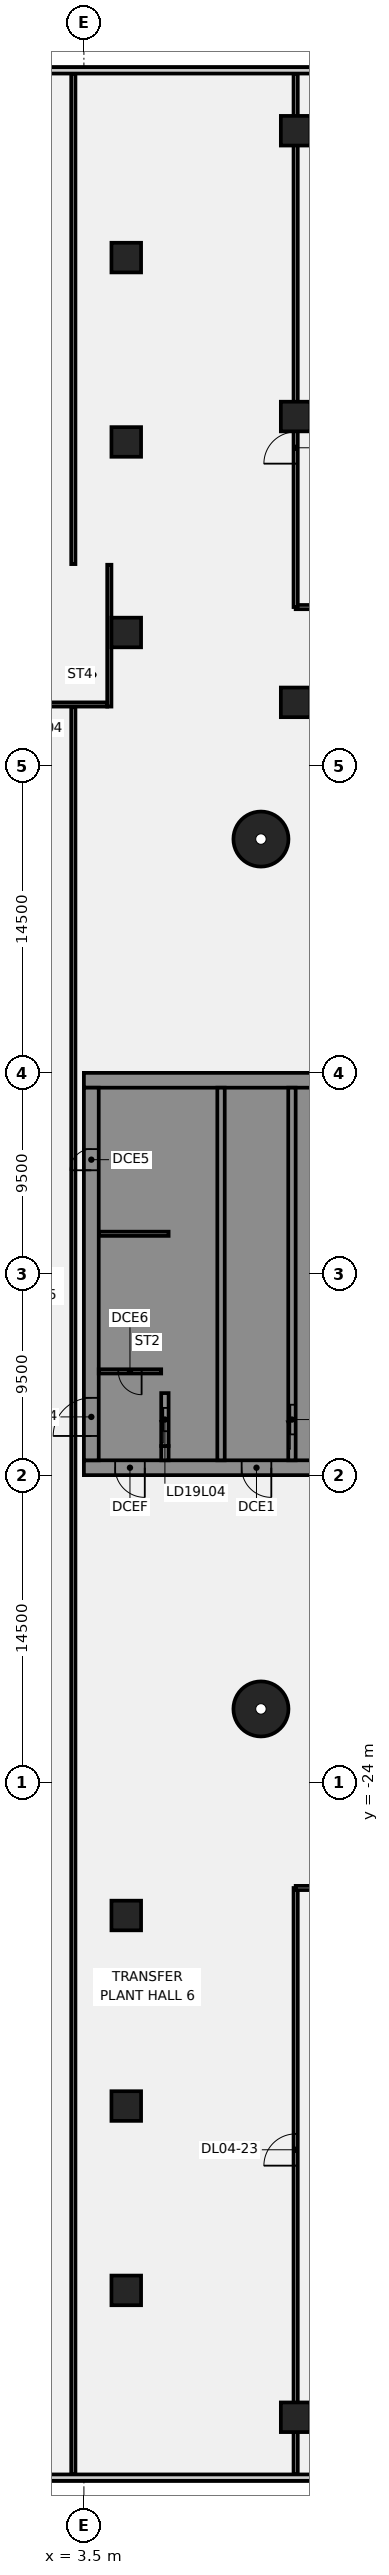
"""IFC4 building model, lengths in metres.
Left out: names, types, materials, properties, quantities, classifications, styles, units other than length and angle.
Written with IfcOpenShell. Run it as: python <this file> out.ifc"""

import sys

from ifc_helpers import new_model, si_unit, direction, frame, frame_2d, origin, origin_2d, place, context, subcontext, project, spatial, polyline, rectangle, circle, outline, extrude, element, fill, save


model = new_model("IFC4")
c1 = context("Model", 3, precision=1e-05, world=origin(), true_north=direction((0.0, 1.0)))
c2 = subcontext(c1, "Body", "Model", "MODEL_VIEW")
j1 = project(units=[si_unit("LENGTHUNIT", "METRE"), si_unit("PLANEANGLEUNIT", "RADIAN")], contexts=[c1])
p1 = place(None, origin())
s1 = spatial("IfcSite", under=j1, at=p1, CompositionType="ELEMENT")
p2 = place(p1, origin())
s2 = spatial("IfcBuilding", under=s1, at=p2, CompositionType="ELEMENT")
p3 = place(p2, frame((0.0, 0.0, 25.0)))
s3 = spatial("IfcBuildingStorey", under=s2, at=p3, CompositionType="ELEMENT", Elevation=25.0)
for number, where, z_axis, x_axis in (
    (1, (11.86, 20.543, -0.45), (0.0, 0.0, 1.0), (1.0, 0.0, 0.0)),
    (2, (11.86, -20.543, -0.45), (0.0, 0.0, 1.0), (1.0, 0.0, 0.0)),
):
    element("IfcColumn", number, at=place(p3, frame(where, z_axis=z_axis, x_axis=x_axis)), inside=s3, PredefinedType="COLUMN", context=c2, shape_type="SweptSolid", body=[
        extrude(circle(Radius=1.3, at=origin_2d()), origin(), (0.0, 0.0, 1.0), 4.35),
    ])
for number, where, z_axis, x_axis in (
    (3, (5.5, 39.3, -0.45), (0.0, 0.0, 1.0), (1.0, 0.0, 0.0)),
    (4, (5.5, 30.3, -0.45), (0.0, 0.0, 1.0), (1.0, 0.0, 0.0)),
    (5, (5.5, 48.008, -0.45), (0.0, 0.0, 1.0), (1.0, 0.0, 0.0)),
    (6, (5.5, -39.3, -0.45), (0.0, 0.0, 1.0), (1.0, 0.0, 0.0)),
    (7, (5.5, -30.3, -0.45), (0.0, 0.0, 1.0), (1.0, 0.0, 0.0)),
    (8, (5.5, -48.008, -0.45), (0.0, 0.0, 1.0), (1.0, 0.0, 0.0)),
    (9, (13.5, -54.0, -0.45), (0.0, 0.0, 1.0), (1.0, 0.0, 0.0)),
    (10, (13.5, 27.0, -0.45), (0.0, 0.0, 1.0), (1.0, 0.0, 0.0)),
    (11, (13.5, 40.5, -0.45), (0.0, 0.0, 1.0), (1.0, 0.0, 0.0)),
    (12, (13.5, 54.0, -0.45), (0.0, 0.0, 1.0), (1.0, 0.0, 0.0)),
):
    element("IfcColumn", number, at=place(p3, frame(where, z_axis=z_axis, x_axis=x_axis)), inside=s3, PredefinedType="COLUMN", context=c2, shape_type="SweptSolid", body=[
        extrude(rectangle(XDim=1.4, YDim=1.4, at=origin_2d()), origin(), (0.0, 0.0, 1.0), 4.35),
    ])
p4 = place(p3, frame((3.0, -56.699, 0.0), z_axis=(0.0, 0.0, 1.0), x_axis=(0.0, 1.0, 0.0)))
e13 = element("IfcWall", 13, at=p4, inside=s3, PredefinedType="PARTITIONING", context=c2, shape_type="SweptSolid", body=[
    extrude(rectangle(XDim=83.469, YDim=0.2, at=frame_2d((41.734, 0.0))), origin(), (0.0, 0.0, 1.0), 3.9),
])
p5 = place(p3, frame((3.0, 33.53, 0.0), z_axis=(0.0, 0.0, 1.0), x_axis=(0.0, 1.0, 0.0)))
e14 = element("IfcWall", 14, at=p5, inside=s3, PredefinedType="PARTITIONING", context=c2, shape_type="SweptSolid", body=[
    extrude(rectangle(XDim=23.169, YDim=0.2, at=frame_2d((11.584, 0.0))), origin(), (0.0, 0.0, 1.0), 3.9),
])
p6 = place(p3, frame((13.5, -56.699, 0.0), z_axis=(0.0, 0.0, 1.0), x_axis=(0.0, 1.0, 0.0)))
e15 = element("IfcWall", 15, at=p6, inside=s3, PredefinedType="PARTITIONING", context=c2, shape_type="SweptSolid", body=[
    extrude(rectangle(XDim=27.699, YDim=0.2, at=frame_2d((13.85, 0.0))), origin(), (0.0, 0.0, 1.0), 3.9),
])
p7 = place(p6, frame((14.584, 0.0, 0.0)))
e16 = element("IfcOpeningElement", 16, at=p7, cuts=e15, PredefinedType="OPENING", context=c2, shape_type="SweptSolid", body=[
    extrude(rectangle(XDim=1.5, YDim=2.1, at=frame_2d((0.75, 1.05))), frame((0.0, 0.11, 0.0), z_axis=(0.0, -1.0, 0.0), x_axis=(1.0, 0.0, 0.0)), (0.0, 0.0, 1.0), 0.22),
])
p8 = place(p3, frame((13.5, -29.0, 0.0), z_axis=(0.0, 0.0, 1.0), x_axis=(1.0, 0.0, 0.0)))
e17 = element("IfcWall", 17, at=p8, inside=s3, PredefinedType="PARTITIONING", context=c2, shape_type="SweptSolid", body=[
    extrude(rectangle(XDim=2.92, YDim=0.2, at=frame_2d((1.46, 0.0))), origin(), (0.0, 0.0, 1.0), 3.9),
])
p9 = place(p3, frame((13.5, 31.5, 0.0), z_axis=(0.0, 0.0, 1.0), x_axis=(1.0, 0.0, 0.0)))
e18 = element("IfcWall", 18, at=p9, inside=s3, PredefinedType="PARTITIONING", context=c2, shape_type="SweptSolid", body=[
    extrude(rectangle(XDim=10.12, YDim=0.2, at=frame_2d((5.06, 0.0))), origin(), (0.0, 0.0, 1.0), 3.9),
])
p10 = place(p3, frame((13.5, 31.5, 0.0), z_axis=(0.0, 0.0, 1.0), x_axis=(0.0, 1.0, 0.0)))
e19 = element("IfcWall", 19, at=p10, inside=s3, PredefinedType="PARTITIONING", context=c2, shape_type="SweptSolid", body=[
    extrude(rectangle(XDim=25.199, YDim=0.2, at=frame_2d((12.6, 0.0))), origin(), (0.0, 0.0, 1.0), 3.9),
])
p11 = place(p10, frame((6.775, 0.0, 0.0)))
e20 = element("IfcOpeningElement", 20, at=p11, cuts=e19, PredefinedType="OPENING", context=c2, shape_type="SweptSolid", body=[
    extrude(rectangle(XDim=1.5, YDim=2.1, at=frame_2d((0.75, 1.05))), frame((0.0, 0.11, 0.0), z_axis=(0.0, -1.0, 0.0), x_axis=(1.0, 0.0, 0.0)), (0.0, 0.0, 1.0), 0.22),
])
p12 = place(p3, frame((55.988, 56.85, 0.0), z_axis=(0.0, 0.0, 1.0), x_axis=(-1.0, 0.0, 0.0)))
e21 = element("IfcWall", 21, at=p12, inside=s3, PredefinedType="SOLIDWALL", context=c2, shape_type="SweptSolid", body=[
    extrude(rectangle(XDim=111.977, YDim=0.3, at=frame_2d((55.988, 0.0))), origin(), (0.0, 0.0, 1.0), 3.9),
])
p13 = place(p12, frame((12.488, 0.0, 1.4)))
e22 = element("IfcOpeningElement", 22, at=p13, cuts=e21, PredefinedType="OPENING", context=c2, shape_type="SweptSolid", body=[
    extrude(rectangle(XDim=6.0, YDim=2.2, at=frame_2d((3.0, 1.1))), frame((0.0, 0.16, 0.0), z_axis=(0.0, -1.0, 0.0), x_axis=(1.0, 0.0, 0.0)), (0.0, 0.0, 1.0), 0.32),
])
p14 = place(p3, frame((-55.988, -56.85, 0.0), z_axis=(0.0, 0.0, 1.0), x_axis=(1.0, 0.0, 0.0)))
e23 = element("IfcWall", 23, at=p14, inside=s3, PredefinedType="SOLIDWALL", context=c2, shape_type="SweptSolid", body=[
    extrude(rectangle(XDim=111.977, YDim=0.3, at=frame_2d((55.988, 0.0))), origin(), (0.0, 0.0, 1.0), 3.9),
])
p15 = place(p14, frame((12.488, 0.0, 1.4)))
e24 = element("IfcOpeningElement", 24, at=p15, cuts=e23, PredefinedType="OPENING", context=c2, shape_type="SweptSolid", body=[
    extrude(rectangle(XDim=6.0, YDim=2.2, at=frame_2d((3.0, 1.1))), frame((0.0, 0.16, 0.0), z_axis=(0.0, -1.0, 0.0), x_axis=(1.0, 0.0, 0.0)), (0.0, 0.0, 1.0), 0.32),
])
p16 = place(p3, frame((16.5, -9.15, 0.0), z_axis=(0.0, 0.0, 1.0), x_axis=(-1.0, 0.0, 0.0)))
e25 = element("IfcWall", 25, at=p16, inside=s3, PredefinedType="SHEAR", context=c2, shape_type="SweptSolid", body=[
    extrude(rectangle(XDim=13.0, YDim=0.7, at=frame_2d((6.5, 0.0))), origin(), (0.0, 0.0, 1.0), 3.9),
])
p17 = place(p16, frame((4.15, 0.0, 0.0)))
e26 = element("IfcOpeningElement", 26, at=p17, cuts=e25, PredefinedType="OPENING", context=c2, shape_type="SweptSolid", body=[
    extrude(rectangle(XDim=1.4, YDim=2.1, at=frame_2d((0.7, 1.05))), frame((0.0, 0.36, 0.0), z_axis=(0.0, -1.0, 0.0), x_axis=(1.0, 0.0, 0.0)), (0.0, 0.0, 1.0), 0.72),
])
p18 = place(p16, frame((10.125, 0.0, 0.0)))
e27 = element("IfcOpeningElement", 27, at=p18, cuts=e25, PredefinedType="OPENING", context=c2, shape_type="SweptSolid", body=[
    extrude(rectangle(XDim=1.4, YDim=2.1, at=frame_2d((0.7, 1.05))), frame((0.0, 0.36, 0.0), z_axis=(0.0, -1.0, 0.0), x_axis=(1.0, 0.0, 0.0)), (0.0, 0.0, 1.0), 0.72),
])
p19 = place(p3, origin())
e28 = element("IfcWall", 28, at=p19, inside=s3, PredefinedType="SHEAR", context=c2, shape_type="SweptSolid", body=[
    extrude(outline(polyline([(13.5, -8.8), (15.8, -8.8), (16.5, -8.8), (16.5, 8.8), (15.8, 8.8), (13.5, 8.8), (13.5, 8.125), (15.8, 8.125), (15.8, 5.625), (13.5, 5.625), (13.5, 5.375), (15.8, 5.375), (15.8, 2.875), (13.5, 2.875), (13.5, 2.625), (15.8, 2.625), (15.8, 0.125), (13.5, 0.125), (13.5, -0.125), (15.8, -0.125), (15.8, -2.625), (13.5, -2.625), (13.5, -2.875), (15.8, -2.875), (15.8, -5.375), (13.5, -5.375), (13.5, -5.625), (15.8, -5.625), (15.8, -8.125), (13.5, -8.125), (13.5, -8.8)])), origin(), (0.0, 0.0, 1.0), 3.9),
])
p20 = place(p3, frame((16.5, 9.15, 0.0), z_axis=(0.0, 0.0, 1.0), x_axis=(-1.0, 0.0, 0.0)))
e29 = element("IfcWall", 29, at=p20, inside=s3, PredefinedType="SHEAR", context=c2, shape_type="SweptSolid", body=[
    extrude(rectangle(XDim=13.0, YDim=0.7, at=frame_2d((6.5, 0.0))), origin(), (0.0, 0.0, 1.0), 3.9),
])
p21 = place(p3, origin())
e30 = element("IfcWall", 30, at=p21, inside=s3, PredefinedType="SHEAR", context=c2, shape_type="SweptSolid", body=[
    extrude(outline(polyline([(9.8, -5.375), (7.5, -5.375), (7.5, -2.875), (9.8, -2.875), (9.8, -2.625), (7.5, -2.625), (7.5, -0.125), (9.8, -0.125), (9.8, 0.125), (7.5, 0.125), (7.5, 2.625), (9.8, 2.625), (9.8, 2.875), (7.5, 2.875), (7.5, 5.375), (9.8, 5.375), (9.8, 5.625), (7.5, 5.625), (7.5, 8.125), (9.8, 8.125), (9.8, 8.8), (7.5, 8.8), (7.15, 8.8), (7.15, -5.625), (7.5, -5.625), (9.8, -5.625), (9.8, -5.375)])), origin(), (0.0, 0.0, 1.0), 3.9),
])
p22 = place(p3, origin())
e31 = element("IfcWall", 31, at=p22, inside=s3, PredefinedType="SHEAR", context=c2, shape_type="SweptSolid", body=[
    extrude(outline(polyline([(7.5, -8.125), (7.5, -8.8), (9.8, -8.8), (9.8, -8.125), (9.8, -5.625), (9.55, -5.625), (9.55, -8.125), (7.5, -8.125)])), origin(), (0.0, 0.0, 1.0), 3.9),
])
p23 = place(p3, frame((7.325, -8.8, 0.0), z_axis=(0.0, 0.0, 1.0), x_axis=(0.0, 1.0, 0.0)))
e32 = element("IfcWall", 32, at=p23, inside=s3, PredefinedType="SHEAR", context=c2, shape_type="SweptSolid", body=[
    extrude(rectangle(XDim=0.675, YDim=0.35, at=frame_2d((0.337, 0.0))), origin(), (0.0, 0.0, 1.0), 3.9),
])
p24 = place(p3, frame((7.5, 1.9, 0.0), z_axis=(0.0, 0.0, 1.0), x_axis=(-1.0, 0.0, 0.0)))
e33 = element("IfcWall", 33, at=p24, inside=s3, PredefinedType="SHEAR", context=c2, shape_type="SweptSolid", body=[
    extrude(rectangle(XDim=3.3, YDim=0.2, at=frame_2d((1.65, 0.0))), origin(), (0.0, 0.0, 1.0), 3.9),
])
p25 = place(p3, frame((13.325, -8.8, 0.0), z_axis=(0.0, 0.0, 1.0), x_axis=(0.0, 1.0, 0.0)))
e34 = element("IfcWall", 34, at=p25, inside=s3, PredefinedType="SHEAR", context=c2, shape_type="SweptSolid", body=[
    extrude(rectangle(XDim=17.6, YDim=0.35, at=frame_2d((8.8, 0.0))), origin(), (0.0, 0.0, 1.0), 3.9),
])
p26 = place(p25, frame((1.225, 0.0, 0.0)))
e35 = element("IfcOpeningElement", 35, at=p26, cuts=e34, PredefinedType="OPENING", context=c2, shape_type="SweptSolid", body=[
    extrude(rectangle(XDim=1.4, YDim=2.1, at=frame_2d((0.7, 1.05))), frame((0.0, 0.185, 0.0), z_axis=(0.0, -1.0, 0.0), x_axis=(1.0, 0.0, 0.0)), (0.0, 0.0, 1.0), 0.37),
])
p27 = place(p3, frame((9.975, -8.8, 0.0), z_axis=(0.0, 0.0, 1.0), x_axis=(0.0, 1.0, 0.0)))
e36 = element("IfcWall", 36, at=p27, inside=s3, PredefinedType="SHEAR", context=c2, shape_type="SweptSolid", body=[
    extrude(rectangle(XDim=17.6, YDim=0.35, at=frame_2d((8.8, 0.0))), origin(), (0.0, 0.0, 1.0), 3.9),
])
p28 = place(p3, frame((7.325, -8.125, 0.0), z_axis=(0.0, 0.0, 1.0), x_axis=(0.0, 1.0, 0.0)))
e37 = element("IfcWall", 37, at=p28, inside=s3, PredefinedType="SHEAR", context=c2, shape_type="SweptSolid", body=[
    extrude(rectangle(XDim=2.5, YDim=0.35, at=frame_2d((1.25, 0.0))), origin(), (0.0, 0.0, 1.0), 3.9),
])
p29 = place(p28, frame((0.7, 0.0, 0.0)))
e38 = element("IfcOpeningElement", 38, at=p29, cuts=e37, PredefinedType="OPENING", context=c2, shape_type="SweptSolid", body=[
    extrude(rectangle(XDim=1.1, YDim=2.1, at=frame_2d((0.55, 1.05))), frame((0.0, 0.185, 0.0), z_axis=(0.0, -1.0, 0.0), x_axis=(1.0, 0.0, 0.0)), (0.0, 0.0, 1.0), 0.37),
])
p30 = place(p3, frame((3.85, -8.8, 0.0), z_axis=(0.0, 0.0, 1.0), x_axis=(0.0, 1.0, 0.0)))
e39 = element("IfcWall", 39, at=p30, inside=s3, PredefinedType="SHEAR", context=c2, shape_type="SweptSolid", body=[
    extrude(rectangle(XDim=17.6, YDim=0.7, at=frame_2d((8.8, 0.0))), origin(), (0.0, 0.0, 1.0), 3.9),
])
p31 = place(p30, frame((1.15, 0.0, 0.0)))
e40 = element("IfcOpeningElement", 40, at=p31, cuts=e39, PredefinedType="OPENING", context=c2, shape_type="SweptSolid", body=[
    extrude(rectangle(XDim=1.8, YDim=2.1, at=frame_2d((0.9, 1.05))), frame((0.0, 0.36, 0.0), z_axis=(0.0, -1.0, 0.0), x_axis=(1.0, 0.0, 0.0)), (0.0, 0.0, 1.0), 0.72),
])
p32 = place(p30, frame((13.7, 0.0, 0.0)))
e41 = element("IfcOpeningElement", 41, at=p32, cuts=e39, PredefinedType="OPENING", context=c2, shape_type="SweptSolid", body=[
    extrude(rectangle(XDim=1.0, YDim=2.1, at=frame_2d((0.5, 1.05))), frame((0.0, 0.36, 0.0), z_axis=(0.0, -1.0, 0.0), x_axis=(1.0, 0.0, 0.0)), (0.0, 0.0, 1.0), 0.72),
])
p33 = place(p3, frame((7.15, -4.6, 0.0), z_axis=(0.0, 0.0, 1.0), x_axis=(-1.0, 0.0, 0.0)))
e42 = element("IfcWall", 42, at=p33, inside=s3, PredefinedType="SHEAR", context=c2, shape_type="SweptSolid", body=[
    extrude(rectangle(XDim=2.95, YDim=0.2, at=frame_2d((1.475, 0.0))), origin(), (0.0, 0.0, 1.0), 3.9),
])
p34 = place(p33, frame((0.925, 0.0, 0.0)))
e43 = element("IfcOpeningElement", 43, at=p34, cuts=e42, PredefinedType="OPENING", context=c2, shape_type="SweptSolid", body=[
    extrude(rectangle(XDim=1.1, YDim=2.1, at=frame_2d((0.55, 1.05))), frame((0.0, 0.11, 0.0), z_axis=(0.0, -1.0, 0.0), x_axis=(1.0, 0.0, 0.0)), (0.0, 0.0, 1.0), 0.22),
])
p35 = place(p3, frame((4.7, 26.8, 0.0), z_axis=(0.0, 0.0, 1.0), x_axis=(0.0, 1.0, 0.0)))
e44 = element("IfcWall", 44, at=p35, inside=s3, PredefinedType="SHEAR", context=c2, shape_type="SweptSolid", body=[
    extrude(rectangle(XDim=6.7, YDim=0.2, at=frame_2d((3.35, 0.0))), origin(), (0.0, 0.0, 1.0), 3.9),
])
p36 = place(p3, frame((4.6, 26.9, 0.0), z_axis=(0.0, 0.0, 1.0), x_axis=(-1.0, 0.0, 0.0)))
e45 = element("IfcWall", 45, at=p36, inside=s3, PredefinedType="SHEAR", context=c2, shape_type="SweptSolid", body=[
    extrude(rectangle(XDim=3.2, YDim=0.2, at=frame_2d((1.6, 0.0))), origin(), (0.0, 0.0, 1.0), 3.9),
])
p37 = place(p3, origin())
e46 = element("IfcWall", 46, at=p37, inside=s3, PredefinedType="SHEAR", context=c2, shape_type="SweptSolid", body=[
    extrude(outline(polyline([(4.6, 33.3), (4.6, 33.5), (1.4, 33.5), (1.4, 33.3), (4.6, 33.3)])), origin(), (0.0, 0.0, 1.0), 3.9),
])
p38 = place(p11, origin())
e47 = element("IfcDoor", 47, at=p38, inside=s3, OperationType="SINGLE_SWING_RIGHT", PredefinedType="DOOR", context=c2, shape_type="SweptSolid", body=[
    extrude(rectangle(XDim=1.5, YDim=2.1, at=frame_2d((0.75, 1.05))), frame((0.0, 0.025, 0.0), z_axis=(0.0, -1.0, 0.0), x_axis=(1.0, 0.0, 0.0)), (0.0, 0.0, 1.0), 0.05),
])
fill(e20, e47)
p39 = place(p7, origin())
e48 = element("IfcDoor", 48, at=p39, inside=s3, OperationType="SINGLE_SWING_LEFT", PredefinedType="DOOR", context=c2, shape_type="SweptSolid", body=[
    extrude(rectangle(XDim=1.5, YDim=2.1, at=frame_2d((0.75, 1.05))), frame((0.0, 0.025, 0.0), z_axis=(0.0, -1.0, 0.0), x_axis=(1.0, 0.0, 0.0)), (0.0, 0.0, 1.0), 0.05),
])
fill(e16, e48)
p40 = place(p17, origin())
e49 = element("IfcDoor", 49, at=p40, inside=s3, OperationType="SINGLE_SWING_LEFT", PredefinedType="DOOR", context=c2, shape_type="SweptSolid", body=[
    extrude(rectangle(XDim=1.4, YDim=2.1, at=frame_2d((0.7, 1.05))), frame((0.0, 0.025, 0.0), z_axis=(0.0, -1.0, 0.0), x_axis=(1.0, 0.0, 0.0)), (0.0, 0.0, 1.0), 0.05),
])
fill(e26, e49)
p41 = place(p18, origin())
e50 = element("IfcDoor", 50, at=p41, inside=s3, OperationType="SINGLE_SWING_LEFT", PredefinedType="DOOR", context=c2, shape_type="SweptSolid", body=[
    extrude(rectangle(XDim=1.4, YDim=2.1, at=frame_2d((0.7, 1.05))), frame((0.0, 0.025, 0.0), z_axis=(0.0, -1.0, 0.0), x_axis=(1.0, 0.0, 0.0)), (0.0, 0.0, 1.0), 0.05),
])
fill(e27, e50)
p42 = place(p31, origin())
e51 = element("IfcDoor", 51, at=p42, inside=s3, OperationType="SINGLE_SWING_LEFT", PredefinedType="DOOR", context=c2, shape_type="SweptSolid", body=[
    extrude(rectangle(XDim=1.8, YDim=2.1, at=frame_2d((0.9, 1.05))), frame((0.0, 0.025, 0.0), z_axis=(0.0, -1.0, 0.0), x_axis=(1.0, 0.0, 0.0)), (0.0, 0.0, 1.0), 0.05),
])
fill(e40, e51)
p43 = place(p32, origin())
e52 = element("IfcDoor", 52, at=p43, inside=s3, OperationType="SINGLE_SWING_LEFT", PredefinedType="DOOR", context=c2, shape_type="SweptSolid", body=[
    extrude(rectangle(XDim=1.0, YDim=2.1, at=frame_2d((0.5, 1.05))), frame((0.0, 0.025, 0.0), z_axis=(0.0, -1.0, 0.0), x_axis=(1.0, 0.0, 0.0)), (0.0, 0.0, 1.0), 0.05),
])
fill(e41, e52)
p44 = place(p34, origin())
e53 = element("IfcDoor", 53, at=p44, inside=s3, OperationType="SINGLE_SWING_LEFT", PredefinedType="DOOR", context=c2, shape_type="SweptSolid", body=[
    extrude(rectangle(XDim=1.1, YDim=2.1, at=frame_2d((0.55, 1.05))), frame((0.0, 0.025, 0.0), z_axis=(0.0, -1.0, 0.0), x_axis=(1.0, 0.0, 0.0)), (0.0, 0.0, 1.0), 0.05),
])
fill(e43, e53)
p45 = place(p26, origin())
e54 = element("IfcDoor", 54, at=p45, inside=s3, OperationType="SLIDING_TO_LEFT", PredefinedType="DOOR", context=c2, shape_type="SweptSolid", body=[
    extrude(rectangle(XDim=1.4, YDim=2.1, at=frame_2d((0.7, 1.05))), frame((0.0, 0.025, 0.0), z_axis=(0.0, -1.0, 0.0), x_axis=(1.0, 0.0, 0.0)), (0.0, 0.0, 1.0), 0.05),
])
fill(e35, e54)
p46 = place(p29, origin())
e55 = element("IfcDoor", 55, at=p46, inside=s3, OperationType="SLIDING_TO_LEFT", PredefinedType="DOOR", context=c2, shape_type="SweptSolid", body=[
    extrude(rectangle(XDim=1.1, YDim=2.1, at=frame_2d((0.55, 1.05))), frame((0.0, 0.025, 0.0), z_axis=(0.0, -1.0, 0.0), x_axis=(1.0, 0.0, 0.0)), (0.0, 0.0, 1.0), 0.05),
])
fill(e38, e55)
save(model, sys.argv[1])
